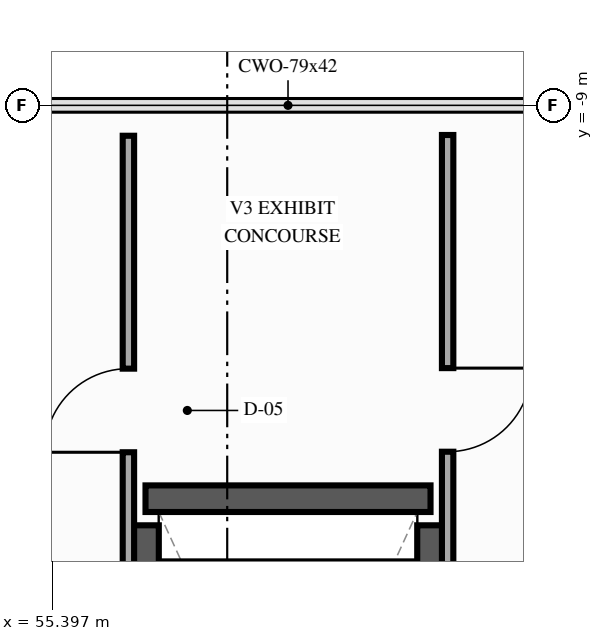
"""IFC4 building model, lengths in metres.
Left out: names, types, materials, properties, quantities, classifications, styles, units other than length and angle.
Written with IfcOpenShell. Run it as: python <this file> out.ifc"""

import sys

from ifc_helpers import new_model, si_unit, direction, frame, frame_2d, origin, place, context, subcontext, project, spatial, rectangle, extrude, element, fill, save


model = new_model("IFC4")
c1 = context("Model", 3, precision=1e-05, world=origin(), true_north=direction((0.0, 1.0)))
c2 = subcontext(c1, "Body", "Model", "MODEL_VIEW")
j1 = project(units=[si_unit("LENGTHUNIT", "METRE"), si_unit("PLANEANGLEUNIT", "RADIAN")], contexts=[c1])
p1 = place(None, origin())
s1 = spatial("IfcSite", under=j1, at=p1, CompositionType="ELEMENT")
p2 = place(p1, origin())
s2 = spatial("IfcBuilding", under=s1, at=p2, CompositionType="ELEMENT")
p3 = place(p2, origin())
s3 = spatial("IfcBuildingStorey", under=s2, at=p3, CompositionType="ELEMENT", Elevation=0.0)
p4 = place(p3, frame((56.625, -14.175, 0.0), z_axis=(0.0, 0.0, 1.0), x_axis=(1.0, 0.0, 0.0)))
e1 = element("IfcWall", 1, at=p4, inside=s3, PredefinedType="SHEAR", context=c2, shape_type="SweptSolid", body=[
    extrude(rectangle(XDim=3.75, YDim=0.35, at=frame_2d((1.875, 0.0))), origin(), (0.0, 0.0, 1.0), 5.12),
])
for number, where, z_axis, x_axis in (
    (2, (56.625, -23.625, 0.0), (0.0, 0.0, 1.0), (0.0, 1.0, 0.0)),
    (3, (60.375, -23.625, 0.0), (0.0, 0.0, 1.0), (0.0, 1.0, 0.0)),
):
    element("IfcWall", number, at=place(p3, frame(where, z_axis=z_axis, x_axis=x_axis)), inside=s3, PredefinedType="SHEAR", context=c2, shape_type="SweptSolid", body=[
        extrude(rectangle(XDim=9.1, YDim=0.35, at=frame_2d((4.55, 0.0))), origin(), (0.0, 0.0, 1.0), 5.12),
    ])
p5 = place(p3, frame((56.4, -23.3, 0.0), z_axis=(0.0, 0.0, 1.0), x_axis=(0.0, 1.0, 0.0)))
e4 = element("IfcWall", 4, at=p5, inside=s3, PredefinedType="PARTITIONING", context=c2, shape_type="SweptSolid", body=[
    extrude(rectangle(XDim=13.9, YDim=0.15, at=frame_2d((6.95, 0.0))), origin(), (0.0, 0.0, 1.0), 4.205),
])
p6 = place(p5, frame((9.736, 0.0, 0.0)))
e5 = element("IfcOpeningElement", 5, at=p6, cuts=e4, PredefinedType="OPENING", context=c2, shape_type="SweptSolid", body=[
    extrude(rectangle(XDim=1.1, YDim=2.15, at=frame_2d((0.55, 1.075))), frame((0.0, 0.085, 0.0), z_axis=(0.0, -1.0, 0.0), x_axis=(1.0, 0.0, 0.0)), (0.0, 0.0, 1.0), 0.17),
])
p7 = place(p3, frame((60.6, -9.39, 0.0), z_axis=(0.0, 0.0, 1.0), x_axis=(0.0, -1.0, 0.0)))
e6 = element("IfcWall", 6, at=p7, inside=s3, PredefinedType="PARTITIONING", context=c2, shape_type="SweptSolid", body=[
    extrude(rectangle(XDim=13.91, YDim=0.15, at=frame_2d((6.955, 0.0))), origin(), (0.0, 0.0, 1.0), 4.205),
])
p8 = place(p7, frame((3.067, 0.0, 0.0)))
e7 = element("IfcOpeningElement", 7, at=p8, cuts=e6, PredefinedType="OPENING", context=c2, shape_type="SweptSolid", body=[
    extrude(rectangle(XDim=1.1, YDim=2.15, at=frame_2d((0.55, 1.075))), frame((0.0, 0.085, 0.0), z_axis=(0.0, -1.0, 0.0), x_axis=(1.0, 0.0, 0.0)), (0.0, 0.0, 1.0), 0.17),
])
p9 = place(p6, origin())
e8 = element("IfcDoor", 8, at=p9, inside=s3, OperationType="SINGLE_SWING_LEFT", PredefinedType="DOOR", context=c2, shape_type="SweptSolid", body=[
    extrude(rectangle(XDim=1.1, YDim=2.15, at=frame_2d((0.55, 1.075))), frame((0.0, 0.025, 0.0), z_axis=(0.0, -1.0, 0.0), x_axis=(1.0, 0.0, 0.0)), (0.0, 0.0, 1.0), 0.05),
])
fill(e5, e8)
p10 = place(p8, origin())
e9 = element("IfcDoor", 9, at=p10, inside=s3, OperationType="SINGLE_SWING_LEFT", PredefinedType="DOOR", context=c2, shape_type="SweptSolid", body=[
    extrude(rectangle(XDim=1.1, YDim=2.15, at=frame_2d((0.55, 1.075))), frame((0.0, 0.025, 0.0), z_axis=(0.0, -1.0, 0.0), x_axis=(1.0, 0.0, 0.0)), (0.0, 0.0, 1.0), 0.05),
])
fill(e7, e9)
save(model, sys.argv[1])
